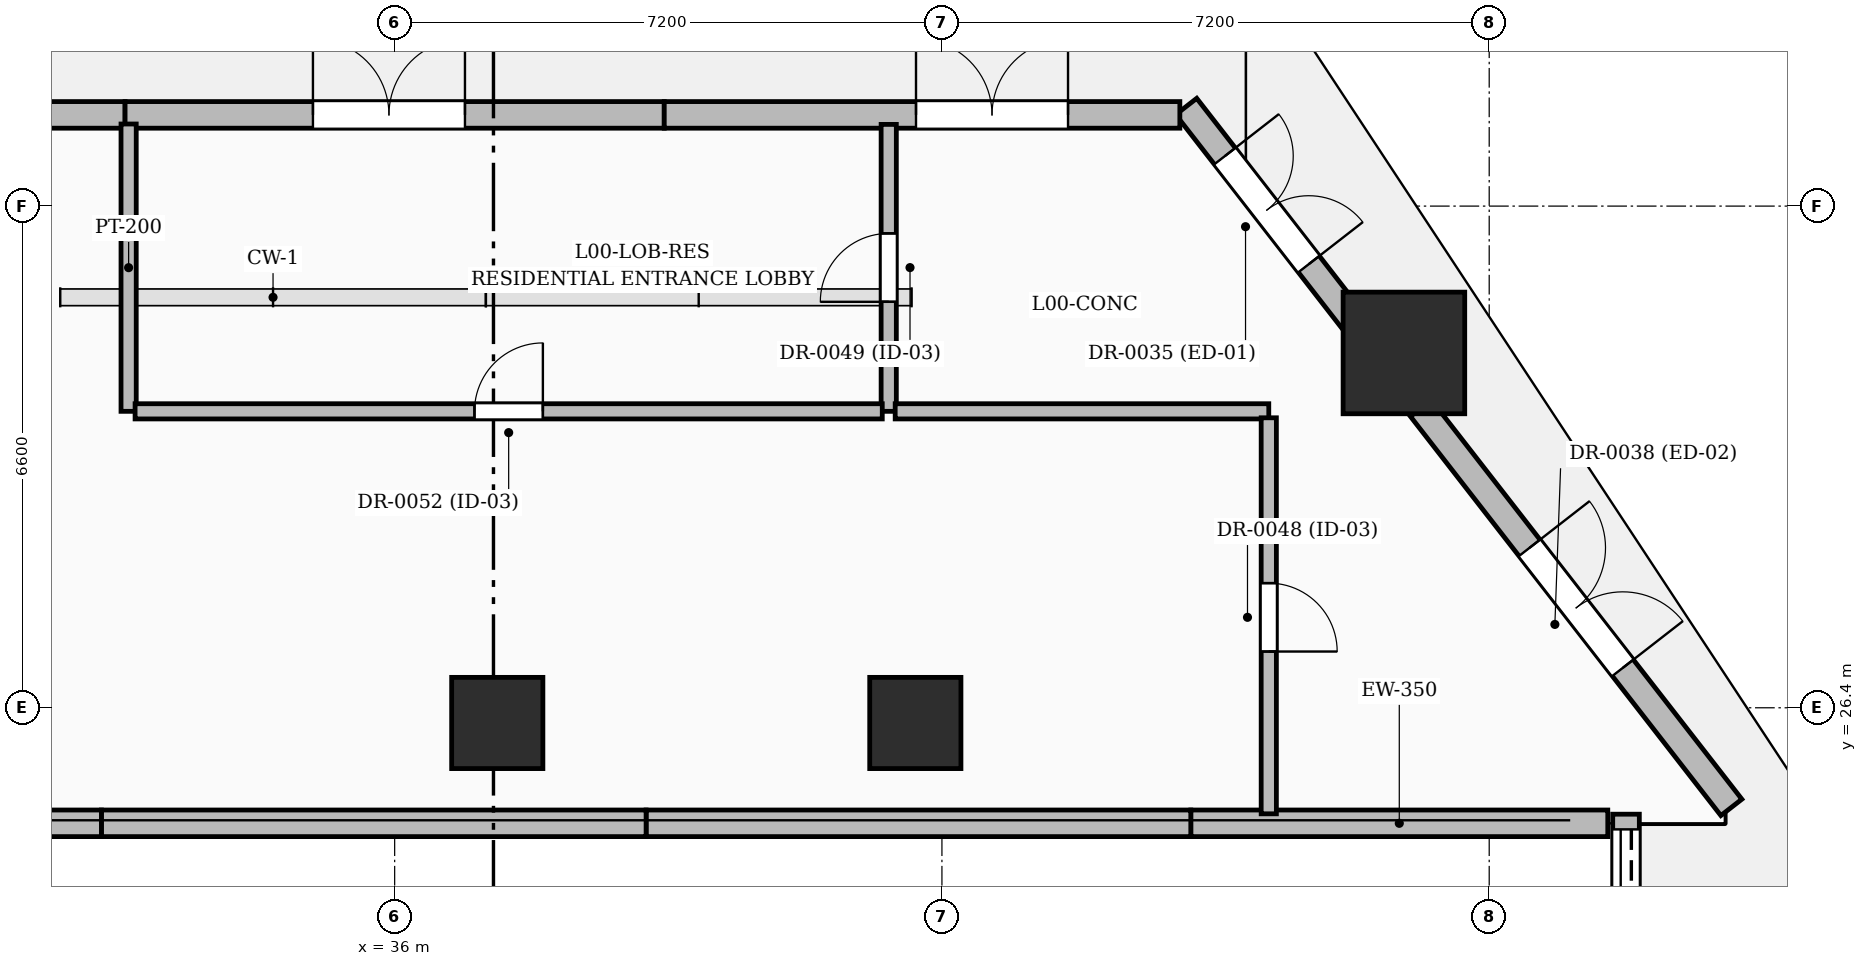
"""IFC4 building model, lengths in metres.
Left out: names, types, materials, properties, quantities, classifications, styles, units other than length and angle.
Written with IfcOpenShell. Run it as: python <this file> out.ifc"""

import sys

from ifc_helpers import new_model, si_unit, direction, frame, frame_2d, origin, origin_2d, place, context, subcontext, project, spatial, rectangle, circle, extrude, element, fill, save


model = new_model("IFC4")
c1 = context("Model", 3, precision=1e-05, world=origin(), true_north=direction((0.0, 1.0)))
c2 = subcontext(c1, "Body", "Model", "MODEL_VIEW")
j1 = project(units=[si_unit("LENGTHUNIT", "METRE"), si_unit("PLANEANGLEUNIT", "RADIAN")], contexts=[c1])
p1 = place(None, origin())
s1 = spatial("IfcSite", under=j1, at=p1, CompositionType="ELEMENT")
p2 = place(p1, origin())
s2 = spatial("IfcBuilding", under=s1, at=p2, CompositionType="ELEMENT")
p3 = place(p2, origin())
s3 = spatial("IfcBuildingStorey", under=s2, at=p3, CompositionType="ELEMENT", Elevation=0.0)
for number, where, z_axis, x_axis in (
    (1, (42.85, 26.2, 0.0), (0.0, 0.0, 1.0), (1.0, 0.0, 0.0)),
    (2, (37.35, 26.2, 0.0), (0.0, 0.0, 1.0), (1.0, 0.0, 0.0)),
):
    element("IfcColumn", number, at=place(p3, frame(where, z_axis=z_axis, x_axis=x_axis)), inside=s3, PredefinedType="COLUMN", context=c2, shape_type="SweptSolid", body=[
        extrude(rectangle(XDim=1.2, YDim=1.2, at=origin_2d()), origin(), (0.0, 0.0, 1.0), 8.4),
    ])
p4 = place(p3, frame((49.278, 31.068, 0.0), z_axis=(0.0, 0.0, 1.0), x_axis=(1.0, 0.0, 0.0)))
e3 = element("IfcColumn", 3, at=p4, inside=s3, PredefinedType="COLUMN", context=c2, shape_type="SweptSolid", body=[
    extrude(circle(Radius=0.8, at=origin_2d()), origin(), (0.0, 0.0, 1.0), 8.4),
])
p5 = place(p3, frame((46.414, 34.311, 0.0), z_axis=(0.0, 0.0, 1.0), x_axis=(0.613935926334, -0.789355862939, 0.0)))
e4 = element("IfcWall", 4, at=p5, inside=s3, PredefinedType="SOLIDWALL", context=c2, shape_type="SweptSolid", body=[
    extrude(rectangle(XDim=3.606, YDim=0.35, at=frame_2d((1.803, 0.0))), origin(), (0.0, 0.0, 1.0), 6.875),
])
p6 = place(p5, frame((0.827, 0.0, 0.0)))
e5 = element("IfcOpeningElement", 5, at=p6, cuts=e4, PredefinedType="OPENING", context=c2, shape_type="SweptSolid", body=[
    extrude(rectangle(XDim=1.8, YDim=2.2, at=frame_2d((0.9, 1.1))), frame((0.0, 0.185, 0.0), z_axis=(0.0, -1.0, 0.0), x_axis=(1.0, 0.0, 0.0)), (0.0, 0.0, 1.0), 0.37),
])
p7 = place(p3, frame((49.502, 30.34, 0.0), z_axis=(0.0, 0.0, 1.0), x_axis=(0.613960942115, -0.789336405822, 0.0)))
e6 = element("IfcWall", 6, at=p7, inside=s3, PredefinedType="SOLIDWALL", context=c2, shape_type="SweptSolid", body=[
    extrude(rectangle(XDim=6.651, YDim=0.35, at=frame_2d((3.326, 0.0))), origin(), (0.0, 0.0, 1.0), 5.875),
])
p8 = place(p7, frame((2.326, 0.0, 0.0)))
e7 = element("IfcOpeningElement", 7, at=p8, cuts=e6, PredefinedType="OPENING", context=c2, shape_type="SweptSolid", body=[
    extrude(rectangle(XDim=2.0, YDim=2.4, at=frame_2d((1.0, 1.2))), frame((0.0, 0.185, 0.0), z_axis=(0.0, -1.0, 0.0), x_axis=(1.0, 0.0, 0.0)), (0.0, 0.0, 1.0), 0.37),
])
p9 = place(p3, frame((51.96, 24.88, 0.0), z_axis=(0.0, 0.0, 1.0), x_axis=(-1.0, 0.0, 0.0)))
e8 = element("IfcWall", 8, at=p9, inside=s3, PredefinedType="SOLIDWALL", context=c2, shape_type="SweptSolid", body=[
    extrude(rectangle(XDim=5.486, YDim=0.35, at=frame_2d((2.743, 0.0))), origin(), (0.0, 0.0, 1.0), 5.875),
])
for number, where, z_axis, x_axis in (
    (9, (46.474, 24.88, 0.0), (0.0, 0.0, 1.0), (-1.0, 0.0, 0.0)),
    (10, (39.308, 24.88, 0.0), (0.0, 0.0, 1.0), (-1.0, 0.0, 0.0)),
):
    element("IfcWall", number, at=place(p3, frame(where, z_axis=z_axis, x_axis=x_axis)), inside=s3, PredefinedType="SOLIDWALL", context=c2, shape_type="SweptSolid", body=[
        extrude(rectangle(XDim=7.166, YDim=0.35, at=frame_2d((3.583, 0.0))), origin(), (0.0, 0.0, 1.0), 7.064),
    ])
p10 = place(p3, frame((32.142, 24.88, 0.0), z_axis=(0.0, 0.0, 1.0), x_axis=(-1.0, 0.0, 0.0)))
e11 = element("IfcWall", 11, at=p10, inside=s3, PredefinedType="SOLIDWALL", context=c2, shape_type="SweptSolid", body=[
    extrude(rectangle(XDim=7.166, YDim=0.35, at=frame_2d((3.583, 0.0))), origin(), (0.0, 0.0, 1.0), 5.875),
])
p11 = place(p3, frame((25.665, 34.2, 0.0), z_axis=(0.0, 0.0, 1.0), x_axis=(1.0, 0.0, 0.0)))
e12 = element("IfcWall", 12, at=p11, inside=s3, PredefinedType="SOLIDWALL", context=c2, shape_type="SweptSolid", body=[
    extrude(rectangle(XDim=6.788, YDim=0.35, at=frame_2d((3.394, 0.0))), origin(), (0.0, 0.0, 1.0), 7.467),
])
p12 = place(p11, frame((2.167, 0.0, 0.0)))
e13 = element("IfcOpeningElement", 13, at=p12, cuts=e12, PredefinedType="OPENING", context=c2, shape_type="SweptSolid", body=[
    extrude(rectangle(XDim=2.0, YDim=2.4, at=frame_2d((1.0, 1.2))), frame((0.0, 0.185, 0.0), z_axis=(0.0, -1.0, 0.0), x_axis=(1.0, 0.0, 0.0)), (0.0, 0.0, 1.0), 0.37),
])
p13 = place(p3, frame((32.453, 34.2, 0.0), z_axis=(0.0, 0.0, 1.0), x_axis=(1.0, 0.0, 0.0)))
e14 = element("IfcWall", 14, at=p13, inside=s3, PredefinedType="SOLIDWALL", context=c2, shape_type="SweptSolid", body=[
    extrude(rectangle(XDim=7.093, YDim=0.35, at=frame_2d((3.547, 0.0))), origin(), (0.0, 0.0, 1.0), 5.875),
])
p14 = place(p13, frame((2.472, 0.0, 0.0)))
e15 = element("IfcOpeningElement", 15, at=p14, cuts=e14, PredefinedType="OPENING", context=c2, shape_type="SweptSolid", body=[
    extrude(rectangle(XDim=2.0, YDim=2.4, at=frame_2d((1.0, 1.2))), frame((0.0, 0.185, 0.0), z_axis=(0.0, -1.0, 0.0), x_axis=(1.0, 0.0, 0.0)), (0.0, 0.0, 1.0), 0.37),
])
p15 = place(p3, frame((39.547, 34.2, 0.0), z_axis=(0.0, 0.0, 1.0), x_axis=(1.0, 0.0, 0.0)))
e16 = element("IfcWall", 16, at=p15, inside=s3, PredefinedType="SOLIDWALL", context=c2, shape_type="SweptSolid", body=[
    extrude(rectangle(XDim=6.783, YDim=0.35, at=frame_2d((3.392, 0.0))), origin(), (0.0, 0.0, 1.0), 5.875),
])
p16 = place(p15, frame((3.312, 0.0, 0.0)))
e17 = element("IfcOpeningElement", 17, at=p16, cuts=e16, PredefinedType="OPENING", context=c2, shape_type="SweptSolid", body=[
    extrude(rectangle(XDim=2.0, YDim=2.4, at=frame_2d((1.0, 1.2))), frame((0.0, 0.185, 0.0), z_axis=(0.0, -1.0, 0.0), x_axis=(1.0, 0.0, 0.0)), (0.0, 0.0, 1.0), 0.37),
])
p17 = place(p3, frame((52.2, 25.0, 0.0), z_axis=(0.0, 0.0, 1.0), x_axis=(0.0, -1.0, 0.0)))
e18 = element("IfcWall", 18, at=p17, inside=s3, PredefinedType="SOLIDWALL", context=c2, shape_type="SweptSolid", body=[
    extrude(rectangle(XDim=7.0, YDim=0.35, at=frame_2d((3.5, 0.0))), origin(), (0.0, 0.0, 1.0), 4.2),
])
p18 = place(p17, frame((0.2, 0.0, 0.0)))
e19 = element("IfcOpeningElement", 19, at=p18, cuts=e18, PredefinedType="OPENING", context=c2, shape_type="SweptSolid", body=[
    extrude(rectangle(XDim=6.6, YDim=2.8, at=frame_2d((3.3, 1.4))), frame((0.0, 0.185, 0.0), z_axis=(0.0, -1.0, 0.0), x_axis=(1.0, 0.0, 0.0)), (0.0, 0.0, 1.0), 0.37),
])
p19 = place(p3, frame((42.5, 30.3, 0.0), z_axis=(0.0, 0.0, 1.0), x_axis=(0.0, 1.0, 0.0)))
e20 = element("IfcWall", 20, at=p19, inside=s3, PredefinedType="PARTITIONING", context=c2, shape_type="SweptSolid", body=[
    extrude(rectangle(XDim=3.775, YDim=0.2, at=frame_2d((1.887, 0.0))), origin(), (0.0, 0.0, 1.0), 5.87),
])
p20 = place(p19, frame((1.441, 0.0, 0.0)))
e21 = element("IfcOpeningElement", 21, at=p20, cuts=e20, PredefinedType="OPENING", context=c2, shape_type="SweptSolid", body=[
    extrude(rectangle(XDim=0.9, YDim=2.1, at=frame_2d((0.45, 1.05))), frame((0.0, 0.11, 0.0), z_axis=(0.0, -1.0, 0.0), x_axis=(1.0, 0.0, 0.0)), (0.0, 0.0, 1.0), 0.22),
])
p21 = place(p3, frame((32.5, 34.08, 0.0), z_axis=(0.0, 0.0, 1.0), x_axis=(0.0, -1.0, 0.0)))
e22 = element("IfcWall", 22, at=p21, inside=s3, PredefinedType="PARTITIONING", context=c2, shape_type="SweptSolid", body=[
    extrude(rectangle(XDim=3.78, YDim=0.2, at=frame_2d((1.89, 0.0))), origin(), (0.0, 0.0, 1.0), 5.87),
])
p22 = place(p3, frame((32.585, 30.3, 0.0), z_axis=(0.0, 0.0, 1.0), x_axis=(1.0, 0.0, 0.0)))
e23 = element("IfcWall", 23, at=p22, inside=s3, PredefinedType="PARTITIONING", context=c2, shape_type="SweptSolid", body=[
    extrude(rectangle(XDim=9.83, YDim=0.2, at=frame_2d((4.915, 0.0))), origin(), (0.0, 0.0, 1.0), 5.87),
])
p23 = place(p22, frame((4.465, 0.0, 0.0)))
e24 = element("IfcOpeningElement", 24, at=p23, cuts=e23, PredefinedType="OPENING", context=c2, shape_type="SweptSolid", body=[
    extrude(rectangle(XDim=0.9, YDim=2.1, at=frame_2d((0.45, 1.05))), frame((0.0, 0.11, 0.0), z_axis=(0.0, -1.0, 0.0), x_axis=(1.0, 0.0, 0.0)), (0.0, 0.0, 1.0), 0.22),
])
p24 = place(p3, frame((42.585, 30.3, 0.0), z_axis=(0.0, 0.0, 1.0), x_axis=(1.0, 0.0, 0.0)))
e25 = element("IfcWall", 25, at=p24, inside=s3, PredefinedType="PARTITIONING", context=c2, shape_type="SweptSolid", body=[
    extrude(rectangle(XDim=4.915, YDim=0.2, at=frame_2d((2.458, 0.0))), origin(), (0.0, 0.0, 1.0), 5.87),
])
p25 = place(p3, frame((47.5, 30.215, 0.0), z_axis=(0.0, 0.0, 1.0), x_axis=(0.0, -1.0, 0.0)))
e26 = element("IfcWall", 26, at=p25, inside=s3, PredefinedType="PARTITIONING", context=c2, shape_type="SweptSolid", body=[
    extrude(rectangle(XDim=5.21, YDim=0.2, at=frame_2d((2.605, 0.0))), origin(), (0.0, 0.0, 1.0), 5.87),
])
p26 = place(p25, frame((2.175, 0.0, 0.0)))
e27 = element("IfcOpeningElement", 27, at=p26, cuts=e26, PredefinedType="OPENING", context=c2, shape_type="SweptSolid", body=[
    extrude(rectangle(XDim=0.9, YDim=2.1, at=frame_2d((0.45, 1.05))), frame((0.0, 0.11, 0.0), z_axis=(0.0, -1.0, 0.0), x_axis=(1.0, 0.0, 0.0)), (0.0, 0.0, 1.0), 0.22),
])
p27 = place(p18, origin())
e28 = element("IfcDoor", 28, at=p27, inside=s3, OperationType="ROLLINGUP", PredefinedType="GATE", context=c2, shape_type="SweptSolid", body=[
    extrude(rectangle(XDim=6.6, YDim=2.8, at=frame_2d((3.3, 1.4))), frame((0.0, 0.025, 0.0), z_axis=(0.0, -1.0, 0.0), x_axis=(1.0, 0.0, 0.0)), (0.0, 0.0, 1.0), 0.05),
])
fill(e19, e28)
p28 = place(p8, origin())
e29 = element("IfcDoor", 29, at=p28, inside=s3, OperationType="DOUBLE_DOOR_SINGLE_SWING", PredefinedType="DOOR", context=c2, shape_type="SweptSolid", body=[
    extrude(rectangle(XDim=2.0, YDim=2.4, at=frame_2d((1.0, 1.2))), frame((0.0, 0.025, 0.0), z_axis=(0.0, -1.0, 0.0), x_axis=(1.0, 0.0, 0.0)), (0.0, 0.0, 1.0), 0.05),
])
fill(e7, e29)
p29 = place(p14, origin())
e30 = element("IfcDoor", 30, at=p29, inside=s3, OperationType="DOUBLE_DOOR_SINGLE_SWING", PredefinedType="DOOR", context=c2, shape_type="SweptSolid", body=[
    extrude(rectangle(XDim=2.0, YDim=2.4, at=frame_2d((1.0, 1.2))), frame((0.0, 0.025, 0.0), z_axis=(0.0, -1.0, 0.0), x_axis=(1.0, 0.0, 0.0)), (0.0, 0.0, 1.0), 0.05),
])
fill(e15, e30)
p30 = place(p16, origin())
e31 = element("IfcDoor", 31, at=p30, inside=s3, OperationType="DOUBLE_DOOR_SINGLE_SWING", PredefinedType="DOOR", context=c2, shape_type="SweptSolid", body=[
    extrude(rectangle(XDim=2.0, YDim=2.4, at=frame_2d((1.0, 1.2))), frame((0.0, 0.025, 0.0), z_axis=(0.0, -1.0, 0.0), x_axis=(1.0, 0.0, 0.0)), (0.0, 0.0, 1.0), 0.05),
])
fill(e17, e31)
p31 = place(p6, origin())
e32 = element("IfcDoor", 32, at=p31, inside=s3, OperationType="DOUBLE_DOOR_SINGLE_SWING", PredefinedType="DOOR", context=c2, shape_type="SweptSolid", body=[
    extrude(rectangle(XDim=1.8, YDim=2.2, at=frame_2d((0.9, 1.1))), frame((0.0, 0.025, 0.0), z_axis=(0.0, -1.0, 0.0), x_axis=(1.0, 0.0, 0.0)), (0.0, 0.0, 1.0), 0.05),
])
fill(e5, e32)
p32 = place(p26, origin())
e33 = element("IfcDoor", 33, at=p32, inside=s3, OperationType="SINGLE_SWING_RIGHT", PredefinedType="DOOR", context=c2, shape_type="SweptSolid", body=[
    extrude(rectangle(XDim=0.9, YDim=2.1, at=frame_2d((0.45, 1.05))), frame((0.0, 0.025, 0.0), z_axis=(0.0, -1.0, 0.0), x_axis=(1.0, 0.0, 0.0)), (0.0, 0.0, 1.0), 0.05),
])
fill(e27, e33)
p33 = place(p20, origin())
e34 = element("IfcDoor", 34, at=p33, inside=s3, OperationType="SINGLE_SWING_LEFT", PredefinedType="DOOR", context=c2, shape_type="SweptSolid", body=[
    extrude(rectangle(XDim=0.9, YDim=2.1, at=frame_2d((0.45, 1.05))), frame((0.0, 0.025, 0.0), z_axis=(0.0, -1.0, 0.0), x_axis=(1.0, 0.0, 0.0)), (0.0, 0.0, 1.0), 0.05),
])
fill(e21, e34)
p34 = place(p23, origin())
e35 = element("IfcDoor", 35, at=p34, inside=s3, OperationType="SINGLE_SWING_RIGHT", PredefinedType="DOOR", context=c2, shape_type="SweptSolid", body=[
    extrude(rectangle(XDim=0.9, YDim=2.1, at=frame_2d((0.45, 1.05))), frame((0.0, 0.025, 0.0), z_axis=(0.0, -1.0, 0.0), x_axis=(1.0, 0.0, 0.0)), (0.0, 0.0, 1.0), 0.05),
])
fill(e24, e35)
save(model, sys.argv[1])
